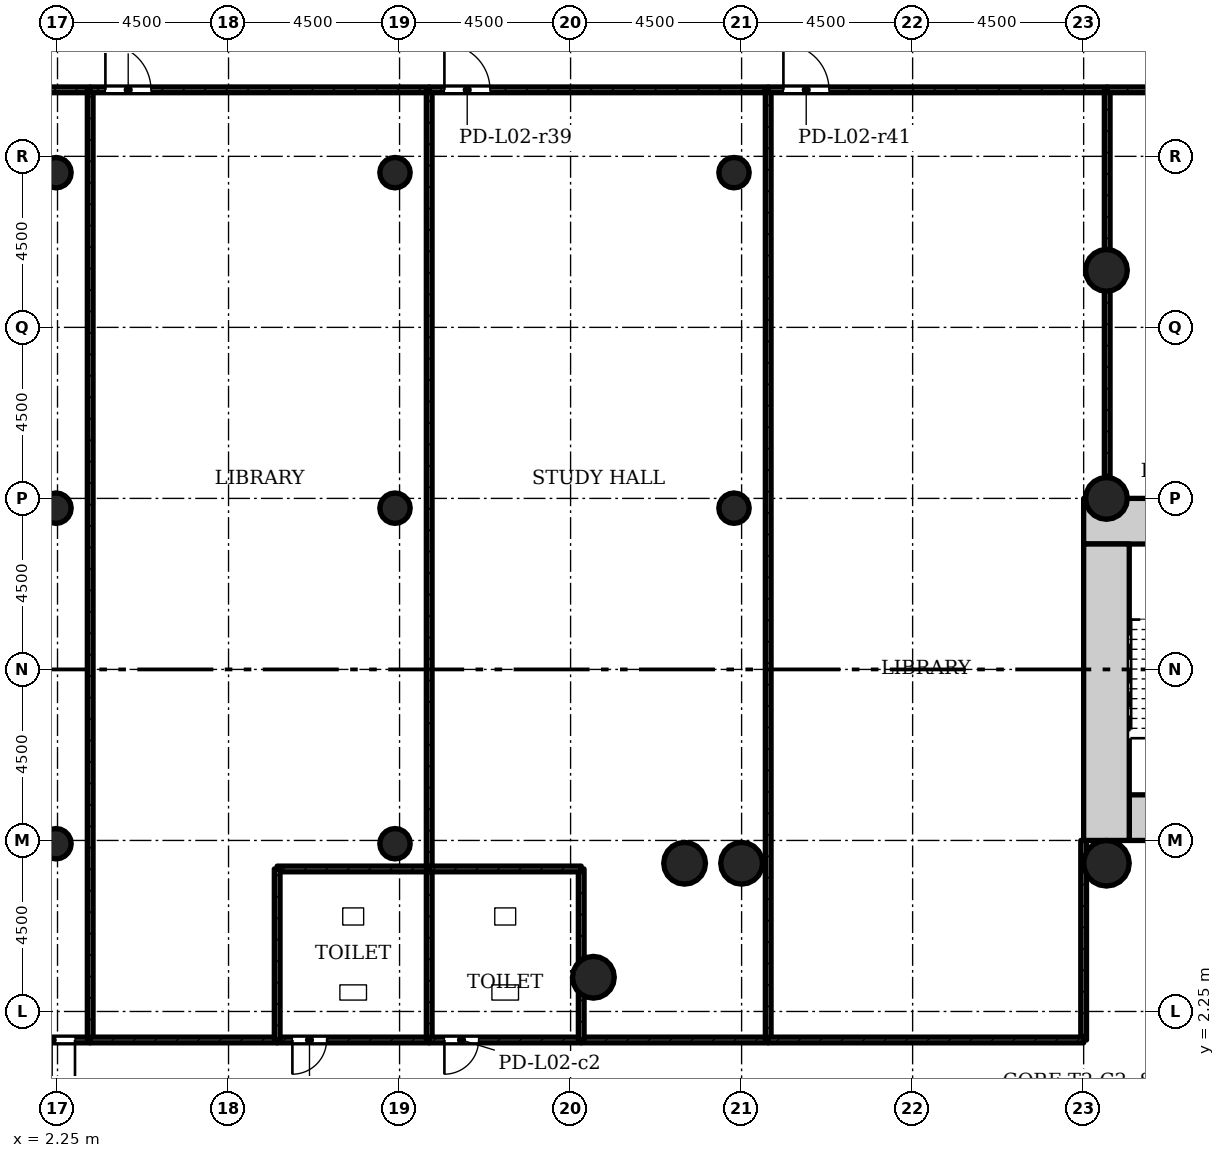
"""IFC4 building model, lengths in metres.
Left out: names, types, materials, properties, quantities, classifications, styles, units other than length and angle.
Written with IfcOpenShell. Run it as: python <this file> out.ifc"""

import sys

from ifc_helpers import new_model, si_unit, direction, frame, frame_2d, origin, origin_2d, place, context, subcontext, project, spatial, rectangle, hollow_circle, extrude, element, fill, save


model = new_model("IFC4")
c1 = context("Model", 3, precision=1e-05, world=origin(), true_north=direction((0.0, 1.0)))
c2 = subcontext(c1, "Body", "Model", "MODEL_VIEW")
j1 = project(units=[si_unit("LENGTHUNIT", "METRE"), si_unit("PLANEANGLEUNIT", "RADIAN")], contexts=[c1])
p1 = place(None, origin())
s1 = spatial("IfcSite", under=j1, at=p1, CompositionType="ELEMENT")
p2 = place(p1, origin())
s2 = spatial("IfcBuilding", under=s1, at=p2, CompositionType="ELEMENT")
p3 = place(p2, frame((0.0, 0.0, 11.0)))
s3 = spatial("IfcBuildingStorey", under=s2, at=p3, CompositionType="ELEMENT", Elevation=11.0)
p4 = place(p3, frame((30.45, 7.35, 0.0), z_axis=(0.0, 0.0, 1.0), x_axis=(1.0, 0.0, 0.0)))
e1 = element("IfcWall", 1, at=p4, inside=s3, PredefinedType="SHEAR", context=c2, shape_type="SweptSolid", body=[
    extrude(rectangle(XDim=12.3, YDim=1.2, at=frame_2d((6.15, 0.0))), origin(), (0.0, 0.0, 1.0), 4.5),
])
p5 = place(p4, frame((4.65, 0.0, 0.0)))
e2 = element("IfcOpeningElement", 2, at=p5, cuts=e1, PredefinedType="OPENING", context=c2, shape_type="SweptSolid", body=[
    extrude(rectangle(XDim=1.8, YDim=2.1, at=frame_2d((0.9, 1.05))), frame((0.0, 0.61, 0.0), z_axis=(0.0, -1.0, 0.0), x_axis=(1.0, 0.0, 0.0)), (0.0, 0.0, 1.0), 1.22),
])
p6 = place(p3, frame((41.55, 15.15, 0.0), z_axis=(0.0, 0.0, 1.0), x_axis=(-1.0, 0.0, 0.0)))
e3 = element("IfcWall", 3, at=p6, inside=s3, PredefinedType="SHEAR", context=c2, shape_type="SweptSolid", body=[
    extrude(rectangle(XDim=12.3, YDim=1.2, at=frame_2d((6.15, 0.0))), origin(), (0.0, 0.0, 1.0), 4.5),
])
p7 = place(p6, frame((4.65, 0.0, 0.0)))
e4 = element("IfcOpeningElement", 4, at=p7, cuts=e3, PredefinedType="OPENING", context=c2, shape_type="SweptSolid", body=[
    extrude(rectangle(XDim=1.8, YDim=2.1, at=frame_2d((0.9, 1.05))), frame((0.0, 0.61, 0.0), z_axis=(0.0, -1.0, 0.0), x_axis=(1.0, 0.0, 0.0)), (0.0, 0.0, 1.0), 1.22),
])
p8 = place(p3, frame((29.85, 14.55, 0.0), z_axis=(0.0, 0.0, 1.0), x_axis=(0.0, -1.0, 0.0)))
e5 = element("IfcWall", 5, at=p8, inside=s3, PredefinedType="SHEAR", context=c2, shape_type="SweptSolid", body=[
    extrude(rectangle(XDim=7.8, YDim=1.2, at=frame_2d((3.9, 0.0))), origin(), (0.0, 0.0, 1.0), 4.5),
])
for number, where, z_axis, x_axis in (
    (6, (29.85, 15.75, 0.0), (0.0, 0.0, 1.0), (1.0, 0.0, 0.0)),
    (7, (29.85, 21.75, 0.0), (0.0, 0.0, 1.0), (1.0, 0.0, 0.0)),
    (8, (20.25, 6.15, 0.0), (0.0, 0.0, 1.0), (1.0, 0.0, 0.0)),
    (9, (18.75, 6.15, 0.0), (0.0, 0.0, 1.0), (1.0, 0.0, 0.0)),
    (10, (16.35, 3.15, 0.0), (0.0, 0.0, 1.0), (1.0, 0.0, 0.0)),
):
    element("IfcColumn", number, at=place(p3, frame(where, z_axis=z_axis, x_axis=x_axis)), inside=s3, PredefinedType="COLUMN", context=c2, shape_type="SweptSolid", body=[
        extrude(hollow_circle(Radius=0.55, WallThickness=0.04, at=origin_2d()), origin(), (0.0, 0.0, 1.0), 4.5),
    ])
p9 = place(p3, frame((29.85, 6.15, 0.0), z_axis=(0.0, 0.0, 1.0), x_axis=(1.0, 0.0, 0.0)))
e11 = element("IfcColumn", 11, at=p9, inside=s3, PredefinedType="COLUMN", context=c2, shape_type="SweptSolid", body=[
    extrude(hollow_circle(Radius=0.6, WallThickness=0.045, at=origin_2d()), origin(), (0.0, 0.0, 1.0), 4.5),
])
for number, where, z_axis, x_axis in (
    (12, (2.21, 6.664, 0.0), (0.0, 0.0, 1.0), (1.0, 0.0, 0.0)),
    (13, (11.13, 6.664, 0.0), (0.0, 0.0, 1.0), (1.0, 0.0, 0.0)),
    (14, (2.21, 15.493, 0.0), (0.0, 0.0, 1.0), (1.0, 0.0, 0.0)),
    (15, (11.13, 15.493, 0.0), (0.0, 0.0, 1.0), (1.0, 0.0, 0.0)),
    (16, (20.05, 15.493, 0.0), (0.0, 0.0, 1.0), (1.0, 0.0, 0.0)),
    (17, (2.21, 24.321, 0.0), (0.0, 0.0, 1.0), (1.0, 0.0, 0.0)),
    (18, (11.13, 24.321, 0.0), (0.0, 0.0, 1.0), (1.0, 0.0, 0.0)),
    (19, (20.05, 24.321, 0.0), (0.0, 0.0, 1.0), (1.0, 0.0, 0.0)),
):
    element("IfcColumn", number, at=place(p3, frame(where, z_axis=z_axis, x_axis=x_axis)), inside=s3, PredefinedType="COLUMN", context=c2, shape_type="SweptSolid", body=[
        extrude(hollow_circle(Radius=0.4, WallThickness=0.028, at=origin_2d()), origin(), (0.0, 0.0, 1.0), 4.5),
    ])
p10 = place(p3, frame((1.15, 26.5, 0.0), z_axis=(0.0, 0.0, 1.0), x_axis=(1.0, 0.0, 0.0)))
e20 = element("IfcWall", 20, at=p10, inside=s3, PredefinedType="PARTITIONING", context=c2, shape_type="SweptSolid", body=[
    extrude(rectangle(XDim=1.96, YDim=0.15, at=frame_2d((0.98, 0.0))), origin(), (0.0, 0.0, 1.0), 4.08),
])
p11 = place(p3, frame((3.11, 1.5, 0.0), z_axis=(0.0, 0.0, 1.0), x_axis=(-1.0, 0.0, 0.0)))
e21 = element("IfcWall", 21, at=p11, inside=s3, PredefinedType="PARTITIONING", context=c2, shape_type="SweptSolid", body=[
    extrude(rectangle(XDim=8.92, YDim=0.15, at=frame_2d((4.46, 0.0))), origin(), (0.0, 0.0, 1.0), 4.08),
])
p12 = place(p11, frame((0.4, 0.0, 0.0)))
e22 = element("IfcOpeningElement", 22, at=p12, cuts=e21, PredefinedType="OPENING", context=c2, shape_type="SweptSolid", body=[
    extrude(rectangle(XDim=1.2, YDim=2.1, at=frame_2d((0.6, 1.05))), frame((0.0, 0.085, 0.0), z_axis=(0.0, -1.0, 0.0), x_axis=(1.0, 0.0, 0.0)), (0.0, 0.0, 1.0), 0.17),
])
p13 = place(p3, frame((3.11, 26.5, 0.0), z_axis=(0.0, 0.0, 1.0), x_axis=(0.0, -1.0, 0.0)))
e23 = element("IfcWall", 23, at=p13, inside=s3, PredefinedType="PARTITIONING", context=c2, shape_type="SweptSolid", body=[
    extrude(rectangle(XDim=25.0, YDim=0.15, at=frame_2d((12.5, 0.0))), origin(), (0.0, 0.0, 1.0), 4.08),
])
p14 = place(p3, frame((8.03, 1.5, 0.0), z_axis=(0.0, 0.0, 1.0), x_axis=(-1.0, 0.0, 0.0)))
e24 = element("IfcWall", 24, at=p14, inside=s3, PredefinedType="PARTITIONING", context=c2, shape_type="SweptSolid", body=[
    extrude(rectangle(XDim=4.92, YDim=0.15, at=frame_2d((2.46, 0.0))), origin(), (0.0, 0.0, 1.0), 4.08),
])
p15 = place(p3, frame((3.11, 26.5, 0.0), z_axis=(0.0, 0.0, 1.0), x_axis=(1.0, 0.0, 0.0)))
e25 = element("IfcWall", 25, at=p15, inside=s3, PredefinedType="PARTITIONING", context=c2, shape_type="SweptSolid", body=[
    extrude(rectangle(XDim=8.92, YDim=0.15, at=frame_2d((4.46, 0.0))), origin(), (0.0, 0.0, 1.0), 4.08),
])
p16 = place(p15, frame((0.4, 0.0, 0.0)))
e26 = element("IfcOpeningElement", 26, at=p16, cuts=e25, PredefinedType="OPENING", context=c2, shape_type="SweptSolid", body=[
    extrude(rectangle(XDim=1.2, YDim=2.1, at=frame_2d((0.6, 1.05))), frame((0.0, 0.085, 0.0), z_axis=(0.0, -1.0, 0.0), x_axis=(1.0, 0.0, 0.0)), (0.0, 0.0, 1.0), 0.17),
])
p17 = place(p3, frame((12.03, 26.5, 0.0), z_axis=(0.0, 0.0, 1.0), x_axis=(0.0, -1.0, 0.0)))
e27 = element("IfcWall", 27, at=p17, inside=s3, PredefinedType="PARTITIONING", context=c2, shape_type="SweptSolid", body=[
    extrude(rectangle(XDim=20.5, YDim=0.15, at=frame_2d((10.25, 0.0))), origin(), (0.0, 0.0, 1.0), 4.08),
])
p18 = place(p3, frame((12.03, 26.5, 0.0), z_axis=(0.0, 0.0, 1.0), x_axis=(1.0, 0.0, 0.0)))
e28 = element("IfcWall", 28, at=p18, inside=s3, PredefinedType="PARTITIONING", context=c2, shape_type="SweptSolid", body=[
    extrude(rectangle(XDim=8.92, YDim=0.15, at=frame_2d((4.46, 0.0))), origin(), (0.0, 0.0, 1.0), 4.08),
])
p19 = place(p18, frame((0.4, 0.0, 0.0)))
e29 = element("IfcOpeningElement", 29, at=p19, cuts=e28, PredefinedType="OPENING", context=c2, shape_type="SweptSolid", body=[
    extrude(rectangle(XDim=1.2, YDim=2.1, at=frame_2d((0.6, 1.05))), frame((0.0, 0.085, 0.0), z_axis=(0.0, -1.0, 0.0), x_axis=(1.0, 0.0, 0.0)), (0.0, 0.0, 1.0), 0.17),
])
p20 = place(p3, frame((20.95, 1.5, 0.0), z_axis=(0.0, 0.0, 1.0), x_axis=(-1.0, 0.0, 0.0)))
e30 = element("IfcWall", 30, at=p20, inside=s3, PredefinedType="PARTITIONING", context=c2, shape_type="SweptSolid", body=[
    extrude(rectangle(XDim=4.92, YDim=0.15, at=frame_2d((2.46, 0.0))), origin(), (0.0, 0.0, 1.0), 4.08),
])
p21 = place(p3, frame((20.95, 26.5, 0.0), z_axis=(0.0, 0.0, 1.0), x_axis=(0.0, -1.0, 0.0)))
e31 = element("IfcWall", 31, at=p21, inside=s3, PredefinedType="PARTITIONING", context=c2, shape_type="SweptSolid", body=[
    extrude(rectangle(XDim=25.0, YDim=0.15, at=frame_2d((12.5, 0.0))), origin(), (0.0, 0.0, 1.0), 4.08),
])
p22 = place(p3, frame((20.95, 26.5, 0.0), z_axis=(0.0, 0.0, 1.0), x_axis=(1.0, 0.0, 0.0)))
e32 = element("IfcWall", 32, at=p22, inside=s3, PredefinedType="PARTITIONING", context=c2, shape_type="SweptSolid", body=[
    extrude(rectangle(XDim=8.92, YDim=0.15, at=frame_2d((4.46, 0.0))), origin(), (0.0, 0.0, 1.0), 4.08),
])
p23 = place(p22, frame((0.4, 0.0, 0.0)))
e33 = element("IfcOpeningElement", 33, at=p23, cuts=e32, PredefinedType="OPENING", context=c2, shape_type="SweptSolid", body=[
    extrude(rectangle(XDim=1.2, YDim=2.1, at=frame_2d((0.6, 1.05))), frame((0.0, 0.085, 0.0), z_axis=(0.0, -1.0, 0.0), x_axis=(1.0, 0.0, 0.0)), (0.0, 0.0, 1.0), 0.17),
])
p24 = place(p3, frame((29.25, 6.75, 0.0), z_axis=(0.0, 0.0, 1.0), x_axis=(0.0, -1.0, 0.0)))
e34 = element("IfcWall", 34, at=p24, inside=s3, PredefinedType="PARTITIONING", context=c2, shape_type="SweptSolid", body=[
    extrude(rectangle(XDim=5.25, YDim=0.15, at=frame_2d((2.625, 0.0))), origin(), (0.0, 0.0, 1.0), 4.08),
])
p25 = place(p3, frame((29.25, 1.5, 0.0), z_axis=(0.0, 0.0, 1.0), x_axis=(-1.0, 0.0, 0.0)))
e35 = element("IfcWall", 35, at=p25, inside=s3, PredefinedType="PARTITIONING", context=c2, shape_type="SweptSolid", body=[
    extrude(rectangle(XDim=8.3, YDim=0.15, at=frame_2d((4.15, 0.0))), origin(), (0.0, 0.0, 1.0), 4.08),
])
p26 = place(p3, frame((29.87, 26.5, 0.0), z_axis=(0.0, 0.0, 1.0), x_axis=(0.0, -1.0, 0.0)))
e36 = element("IfcWall", 36, at=p26, inside=s3, PredefinedType="PARTITIONING", context=c2, shape_type="SweptSolid", body=[
    extrude(rectangle(XDim=10.75, YDim=0.15, at=frame_2d((5.375, 0.0))), origin(), (0.0, 0.0, 1.0), 4.08),
])
p27 = place(p3, frame((29.87, 26.5, 0.0), z_axis=(0.0, 0.0, 1.0), x_axis=(1.0, 0.0, 0.0)))
e37 = element("IfcWall", 37, at=p27, inside=s3, PredefinedType="PARTITIONING", context=c2, shape_type="SweptSolid", body=[
    extrude(rectangle(XDim=4.63, YDim=0.15, at=frame_2d((2.315, 0.0))), origin(), (0.0, 0.0, 1.0), 4.08),
])
p28 = place(p3, frame((8.03, 1.5, 0.0), z_axis=(0.0, 0.0, 1.0), x_axis=(1.0, 0.0, 0.0)))
e38 = element("IfcWall", 38, at=p28, inside=s3, PredefinedType="PARTITIONING", context=c2, shape_type="SweptSolid", body=[
    extrude(rectangle(XDim=4.0, YDim=0.15, at=frame_2d((2.0, 0.0))), origin(), (0.0, 0.0, 1.0), 4.08),
])
p29 = place(p28, frame((0.4, 0.0, 0.0)))
e39 = element("IfcOpeningElement", 39, at=p29, cuts=e38, PredefinedType="OPENING", context=c2, shape_type="SweptSolid", body=[
    extrude(rectangle(XDim=0.9, YDim=2.1, at=frame_2d((0.45, 1.05))), frame((0.0, 0.085, 0.0), z_axis=(0.0, -1.0, 0.0), x_axis=(1.0, 0.0, 0.0)), (0.0, 0.0, 1.0), 0.17),
])
p30 = place(p3, frame((12.03, 6.0, 0.0), z_axis=(0.0, 0.0, 1.0), x_axis=(-1.0, 0.0, 0.0)))
e40 = element("IfcWall", 40, at=p30, inside=s3, PredefinedType="PARTITIONING", context=c2, shape_type="SweptSolid", body=[
    extrude(rectangle(XDim=4.0, YDim=0.15, at=frame_2d((2.0, 0.0))), origin(), (0.0, 0.0, 1.0), 4.08),
])
for number, where, z_axis, x_axis in (
    (41, (8.03, 6.0, 0.0), (0.0, 0.0, 1.0), (0.0, -1.0, 0.0)),
    (42, (12.03, 1.5, 0.0), (0.0, 0.0, 1.0), (0.0, 1.0, 0.0)),
):
    element("IfcWall", number, at=place(p3, frame(where, z_axis=z_axis, x_axis=x_axis)), inside=s3, PredefinedType="PARTITIONING", context=c2, shape_type="SweptSolid", body=[
        extrude(rectangle(XDim=4.5, YDim=0.15, at=frame_2d((2.25, 0.0))), origin(), (0.0, 0.0, 1.0), 4.08),
    ])
p31 = place(p3, frame((12.03, 1.5, 0.0), z_axis=(0.0, 0.0, 1.0), x_axis=(1.0, 0.0, 0.0)))
e43 = element("IfcWall", 43, at=p31, inside=s3, PredefinedType="PARTITIONING", context=c2, shape_type="SweptSolid", body=[
    extrude(rectangle(XDim=4.0, YDim=0.15, at=frame_2d((2.0, 0.0))), origin(), (0.0, 0.0, 1.0), 4.08),
])
p32 = place(p31, frame((0.4, 0.0, 0.0)))
e44 = element("IfcOpeningElement", 44, at=p32, cuts=e43, PredefinedType="OPENING", context=c2, shape_type="SweptSolid", body=[
    extrude(rectangle(XDim=0.9, YDim=2.1, at=frame_2d((0.45, 1.05))), frame((0.0, 0.085, 0.0), z_axis=(0.0, -1.0, 0.0), x_axis=(1.0, 0.0, 0.0)), (0.0, 0.0, 1.0), 0.17),
])
p33 = place(p3, frame((16.03, 1.5, 0.0), z_axis=(0.0, 0.0, 1.0), x_axis=(0.0, 1.0, 0.0)))
e45 = element("IfcWall", 45, at=p33, inside=s3, PredefinedType="PARTITIONING", context=c2, shape_type="SweptSolid", body=[
    extrude(rectangle(XDim=4.5, YDim=0.15, at=frame_2d((2.25, 0.0))), origin(), (0.0, 0.0, 1.0), 4.08),
])
p34 = place(p3, frame((16.03, 6.0, 0.0), z_axis=(0.0, 0.0, 1.0), x_axis=(-1.0, 0.0, 0.0)))
e46 = element("IfcWall", 46, at=p34, inside=s3, PredefinedType="PARTITIONING", context=c2, shape_type="SweptSolid", body=[
    extrude(rectangle(XDim=4.0, YDim=0.15, at=frame_2d((2.0, 0.0))), origin(), (0.0, 0.0, 1.0), 4.08),
])
p35 = place(p12, origin())
e47 = element("IfcDoor", 47, at=p35, inside=s3, OperationType="SINGLE_SWING_RIGHT", PredefinedType="DOOR", context=c2, shape_type="SweptSolid", body=[
    extrude(rectangle(XDim=1.2, YDim=2.1, at=frame_2d((0.6, 1.05))), frame((0.0, 0.025, 0.0), z_axis=(0.0, -1.0, 0.0), x_axis=(1.0, 0.0, 0.0)), (0.0, 0.0, 1.0), 0.05),
])
fill(e22, e47)
p36 = place(p16, origin())
e48 = element("IfcDoor", 48, at=p36, inside=s3, OperationType="SINGLE_SWING_RIGHT", PredefinedType="DOOR", context=c2, shape_type="SweptSolid", body=[
    extrude(rectangle(XDim=1.2, YDim=2.1, at=frame_2d((0.6, 1.05))), frame((0.0, 0.025, 0.0), z_axis=(0.0, -1.0, 0.0), x_axis=(1.0, 0.0, 0.0)), (0.0, 0.0, 1.0), 0.05),
])
fill(e26, e48)
p37 = place(p19, origin())
e49 = element("IfcDoor", 49, at=p37, inside=s3, OperationType="SINGLE_SWING_RIGHT", PredefinedType="DOOR", context=c2, shape_type="SweptSolid", body=[
    extrude(rectangle(XDim=1.2, YDim=2.1, at=frame_2d((0.6, 1.05))), frame((0.0, 0.025, 0.0), z_axis=(0.0, -1.0, 0.0), x_axis=(1.0, 0.0, 0.0)), (0.0, 0.0, 1.0), 0.05),
])
fill(e29, e49)
p38 = place(p23, origin())
e50 = element("IfcDoor", 50, at=p38, inside=s3, OperationType="SINGLE_SWING_RIGHT", PredefinedType="DOOR", context=c2, shape_type="SweptSolid", body=[
    extrude(rectangle(XDim=1.2, YDim=2.1, at=frame_2d((0.6, 1.05))), frame((0.0, 0.025, 0.0), z_axis=(0.0, -1.0, 0.0), x_axis=(1.0, 0.0, 0.0)), (0.0, 0.0, 1.0), 0.05),
])
fill(e33, e50)
p39 = place(p29, origin())
e51 = element("IfcDoor", 51, at=p39, inside=s3, OperationType="SINGLE_SWING_LEFT", PredefinedType="DOOR", context=c2, shape_type="SweptSolid", body=[
    extrude(rectangle(XDim=0.9, YDim=2.1, at=frame_2d((0.45, 1.05))), frame((0.0, 0.025, 0.0), z_axis=(0.0, -1.0, 0.0), x_axis=(1.0, 0.0, 0.0)), (0.0, 0.0, 1.0), 0.05),
])
fill(e39, e51)
p40 = place(p32, origin())
e52 = element("IfcDoor", 52, at=p40, inside=s3, OperationType="SINGLE_SWING_LEFT", PredefinedType="DOOR", context=c2, shape_type="SweptSolid", body=[
    extrude(rectangle(XDim=0.9, YDim=2.1, at=frame_2d((0.45, 1.05))), frame((0.0, 0.025, 0.0), z_axis=(0.0, -1.0, 0.0), x_axis=(1.0, 0.0, 0.0)), (0.0, 0.0, 1.0), 0.05),
])
fill(e44, e52)
save(model, sys.argv[1])
